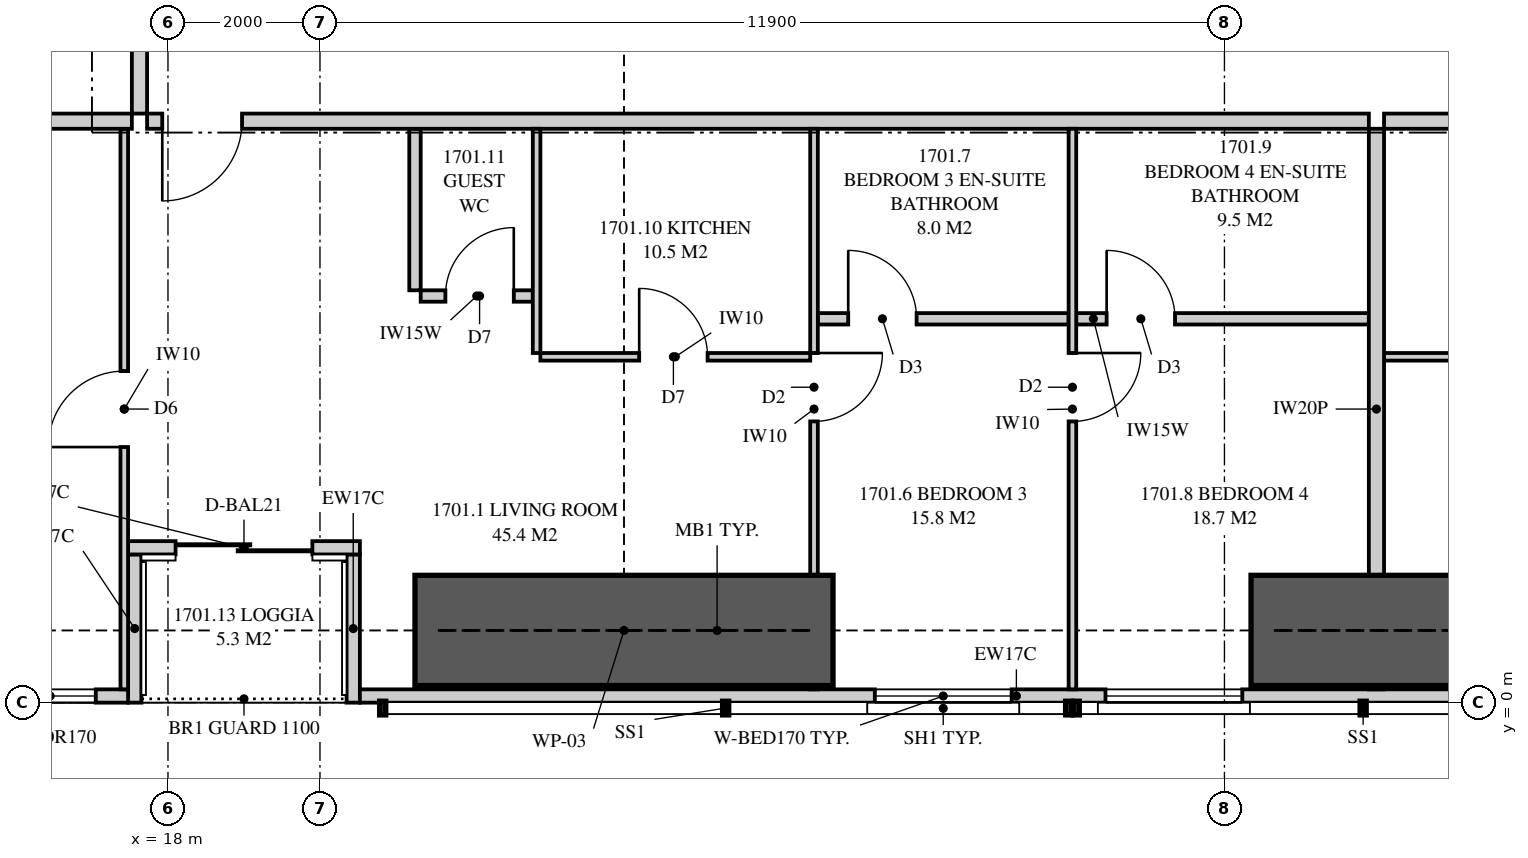
"""IFC4 building model, lengths in metres.
Left out: names, types, materials, properties, quantities, classifications, styles, units other than length and angle.
Written with IfcOpenShell. Run it as: python <this file> out.ifc"""

import sys

from ifc_helpers import new_model, si_unit, direction, frame, frame_2d, origin, place, context, subcontext, project, spatial, polyline, rectangle, outline, extrude, element, fill, save


model = new_model("IFC4")
c1 = context("Model", 3, precision=1e-05, world=origin(), true_north=direction((0.0, 1.0)))
c2 = subcontext(c1, "Body", "Model", "MODEL_VIEW")
j1 = project(units=[si_unit("LENGTHUNIT", "METRE"), si_unit("PLANEANGLEUNIT", "RADIAN")], contexts=[c1])
p1 = place(None, origin())
s1 = spatial("IfcSite", under=j1, at=p1, CompositionType="ELEMENT")
p2 = place(p1, origin())
s2 = spatial("IfcBuilding", under=s1, at=p2, CompositionType="ELEMENT")
p3 = place(p2, frame((0.0, 0.0, 64.55)))
s3 = spatial("IfcBuildingStorey", under=s2, at=p3, CompositionType="ELEMENT", Elevation=64.55)
p4 = place(p3, frame((5.051, 0.087, 0.0), z_axis=(0.0, 0.0, 1.0), x_axis=(1.0, 0.0, 0.0)))
e1 = element("IfcWall", 1, at=p4, inside=s3, PredefinedType="SOLIDWALL", context=c2, shape_type="SweptSolid", body=[
    extrude(outline(polyline([(0.0, 0.0), (12.424, 0.0), (12.424, 2.15), (7.949, 2.15), (7.949, 3.11), (7.793, 3.11), (7.793, 2.15), (7.745, 2.15), (7.745, 3.11), (0.0, 3.11), (0.0, 0.0)])), frame((0.0, 0.087, 0.0), z_axis=(0.0, -1.0, 0.0), x_axis=(1.0, 0.0, 0.0)), (0.0, 0.0, 1.0), 0.175),
])
p5 = place(p4, frame((2.224, 0.0, 0.4)))
e2 = element("IfcOpeningElement", 2, at=p5, cuts=e1, PredefinedType="OPENING", context=c2, shape_type="SweptSolid", body=[
    extrude(rectangle(XDim=1.8, YDim=1.7, at=frame_2d((0.9, 0.85))), frame((0.0, 0.097, 0.0), z_axis=(0.0, -1.0, 0.0), x_axis=(1.0, 0.0, 0.0)), (0.0, 0.0, 1.0), 0.195),
])
p6 = place(p4, frame((10.799, 0.0, 0.4)))
e3 = element("IfcOpeningElement", 3, at=p6, cuts=e1, PredefinedType="OPENING", context=c2, shape_type="SweptSolid", body=[
    extrude(rectangle(XDim=1.2, YDim=1.7, at=frame_2d((0.6, 0.85))), frame((0.0, 0.097, 0.0), z_axis=(0.0, -1.0, 0.0), x_axis=(1.0, 0.0, 0.0)), (0.0, 0.0, 1.0), 0.195),
])
p7 = place(p3, frame((20.525, 0.087, 0.0), z_axis=(0.0, 0.0, 1.0), x_axis=(1.0, 0.0, 0.0)))
e4 = element("IfcWall", 4, at=p7, inside=s3, PredefinedType="SOLIDWALL", context=c2, shape_type="SweptSolid", body=[
    extrude(outline(polyline([(0.0, 0.0), (17.275, 0.0), (17.275, 3.11), (14.679, 3.11), (14.679, 2.15), (14.631, 2.15), (14.631, 3.11), (14.475, 3.11), (14.475, 2.15), (0.0, 2.15), (0.0, 0.0)])), frame((0.0, 0.087, 0.0), z_axis=(0.0, -1.0, 0.0), x_axis=(1.0, 0.0, 0.0)), (0.0, 0.0, 1.0), 0.175),
])
p8 = place(p7, frame((6.775, 0.0, 0.4)))
e5 = element("IfcOpeningElement", 5, at=p8, cuts=e4, PredefinedType="OPENING", context=c2, shape_type="SweptSolid", body=[
    extrude(rectangle(XDim=1.8, YDim=1.7, at=frame_2d((0.9, 0.85))), frame((0.0, 0.097, 0.0), z_axis=(0.0, -1.0, 0.0), x_axis=(1.0, 0.0, 0.0)), (0.0, 0.0, 1.0), 0.195),
])
p9 = place(p7, frame((9.81, 0.0, 0.4)))
e6 = element("IfcOpeningElement", 6, at=p9, cuts=e4, PredefinedType="OPENING", context=c2, shape_type="SweptSolid", body=[
    extrude(rectangle(XDim=1.8, YDim=1.7, at=frame_2d((0.9, 0.85))), frame((0.0, 0.097, 0.0), z_axis=(0.0, -1.0, 0.0), x_axis=(1.0, 0.0, 0.0)), (0.0, 0.0, 1.0), 0.195),
])
p10 = place(p3, frame((17.475, 2.038, 0.0), z_axis=(0.0, 0.0, 1.0), x_axis=(1.0, 0.0, 0.0)))
e7 = element("IfcWall", 7, at=p10, inside=s3, PredefinedType="SOLIDWALL", context=c2, shape_type="SweptSolid", body=[
    extrude(rectangle(XDim=3.05, YDim=0.175, at=frame_2d((1.525, 0.0))), origin(), (0.0, 0.0, 1.0), 3.11),
])
p11 = place(p10, frame((0.625, 0.0, 0.0)))
e8 = element("IfcOpeningElement", 8, at=p11, cuts=e7, PredefinedType="OPENING", context=c2, shape_type="SweptSolid", body=[
    extrude(rectangle(XDim=1.8, YDim=2.1, at=frame_2d((0.9, 1.05))), frame((0.0, 0.097, 0.0), z_axis=(0.0, -1.0, 0.0), x_axis=(1.0, 0.0, 0.0)), (0.0, 0.0, 1.0), 0.195),
])
for number, where, z_axis, x_axis in (
    (9, (17.562, 0.0, 0.0), (0.0, 0.0, 1.0), (0.0, 1.0, 0.0)),
    (10, (20.438, 0.0, 0.0), (0.0, 0.0, 1.0), (0.0, 1.0, 0.0)),
):
    element("IfcWall", number, at=place(p3, frame(where, z_axis=z_axis, x_axis=x_axis)), inside=s3, PredefinedType="SOLIDWALL", context=c2, shape_type="SweptSolid", body=[
        extrude(outline(polyline([(0.0, 0.0), (1.95, 0.0), (1.95, 3.11), (1.75, 3.11), (1.75, 2.15), (0.15, 2.15), (0.15, 3.11), (0.0, 3.11), (0.0, 0.0)])), frame((0.0, 0.087, 0.0), z_axis=(0.0, -1.0, 0.0), x_axis=(1.0, 0.0, 0.0)), (0.0, 0.0, 1.0), 0.175),
    ])
p12 = place(p3, frame((33.9, 0.175, 0.0), z_axis=(0.0, 0.0, 1.0), x_axis=(0.0, 1.0, 0.0)))
e11 = element("IfcWall", 11, at=p12, inside=s3, PredefinedType="PARTITIONING", context=c2, shape_type="SweptSolid", body=[
    extrude(outline(polyline([(0.529, 2.15), (0.0, 2.15), (0.0, 0.0), (0.529, 0.0), (0.529, 0.752), (1.021, 0.752), (1.021, 0.0), (7.375, 0.0), (7.375, 3.11), (1.685, 3.11), (1.685, 2.15), (1.021, 2.15), (1.021, 1.398), (0.529, 1.398), (0.529, 2.15)])), frame((0.0, 0.1, 0.0), z_axis=(0.0, -1.0, 0.0), x_axis=(1.0, 0.0, 0.0)), (0.0, 0.0, 1.0), 0.2),
])
p13 = place(p3, frame((17.725, 7.65, 0.0), z_axis=(0.0, 0.0, 1.0), x_axis=(1.0, 0.0, 0.0)))
e12 = element("IfcWall", 12, at=p13, inside=s3, PredefinedType="PARTITIONING", context=c2, shape_type="SweptSolid", body=[
    extrude(outline(polyline([(0.0, 0.0), (16.075, 0.0), (16.075, 3.11), (6.612, 3.11), (6.612, 2.541), (5.938, 2.541), (5.938, 3.11), (0.0, 3.11), (0.0, 0.0)])), frame((0.0, 0.1, 0.0), z_axis=(0.0, -1.0, 0.0), x_axis=(1.0, 0.0, 0.0)), (0.0, 0.0, 1.0), 0.2),
])
p14 = place(p13, frame((0.2, 0.0, 0.0)))
e13 = element("IfcOpeningElement", 13, at=p14, cuts=e12, PredefinedType="OPENING", context=c2, shape_type="SweptSolid", body=[
    extrude(rectangle(XDim=1.05, YDim=2.2, at=frame_2d((0.525, 1.1))), frame((0.0, 0.11, 0.0), z_axis=(0.0, -1.0, 0.0), x_axis=(1.0, 0.0, 0.0)), (0.0, 0.0, 1.0), 0.22),
])
p15 = place(p3, frame((26.5, 0.175, 0.0), z_axis=(0.0, 0.0, 1.0), x_axis=(0.0, 1.0, 0.0)))
e14 = element("IfcWall", 14, at=p15, inside=s3, PredefinedType="PARTITIONING", context=c2, shape_type="SweptSolid", body=[
    extrude(outline(polyline([(0.0, 0.0), (7.375, 0.0), (7.375, 3.11), (1.635, 3.11), (1.635, 2.15), (0.0, 2.15), (0.0, 3.11), (0.0, 0.0)])), frame((0.0, 0.05, 0.0), z_axis=(0.0, -1.0, 0.0), x_axis=(1.0, 0.0, 0.0)), (0.0, 0.0, 1.0), 0.1),
])
p16 = place(p15, frame((3.525, 0.0, 0.0)))
e15 = element("IfcOpeningElement", 15, at=p16, cuts=e14, PredefinedType="OPENING", context=c2, shape_type="SweptSolid", body=[
    extrude(rectangle(XDim=0.9, YDim=2.1, at=frame_2d((0.45, 1.05))), frame((0.0, 0.06, 0.0), z_axis=(0.0, -1.0, 0.0), x_axis=(1.0, 0.0, 0.0)), (0.0, 0.0, 1.0), 0.12),
])
p17 = place(p3, frame((29.9, 0.175, 0.0), z_axis=(0.0, 0.0, 1.0), x_axis=(0.0, 1.0, 0.0)))
e16 = element("IfcWall", 16, at=p17, inside=s3, PredefinedType="PARTITIONING", context=c2, shape_type="SweptSolid", body=[
    extrude(outline(polyline([(0.0, 0.0), (7.375, 0.0), (7.375, 3.11), (1.635, 3.11), (1.635, 2.15), (0.0, 2.15), (0.0, 3.11), (0.0, 0.0)])), frame((0.0, 0.05, 0.0), z_axis=(0.0, -1.0, 0.0), x_axis=(1.0, 0.0, 0.0)), (0.0, 0.0, 1.0), 0.1),
])
p18 = place(p17, frame((3.525, 0.0, 0.0)))
e17 = element("IfcOpeningElement", 17, at=p18, cuts=e16, PredefinedType="OPENING", context=c2, shape_type="SweptSolid", body=[
    extrude(rectangle(XDim=0.9, YDim=2.1, at=frame_2d((0.45, 1.05))), frame((0.0, 0.06, 0.0), z_axis=(0.0, -1.0, 0.0), x_axis=(1.0, 0.0, 0.0)), (0.0, 0.0, 1.0), 0.12),
])
p19 = place(p3, frame((26.55, 5.05, 0.0), z_axis=(0.0, 0.0, 1.0), x_axis=(1.0, 0.0, 0.0)))
e18 = element("IfcWall", 18, at=p19, inside=s3, PredefinedType="PLUMBINGWALL", context=c2, shape_type="SweptSolid", body=[
    extrude(rectangle(XDim=3.3, YDim=0.15, at=frame_2d((1.65, 0.0))), origin(), (0.0, 0.0, 1.0), 3.11),
])
p20 = place(p19, frame((0.4, 0.0, 0.0)))
e19 = element("IfcOpeningElement", 19, at=p20, cuts=e18, PredefinedType="OPENING", context=c2, shape_type="SweptSolid", body=[
    extrude(rectangle(XDim=0.9, YDim=2.1, at=frame_2d((0.45, 1.05))), frame((0.0, 0.085, 0.0), z_axis=(0.0, -1.0, 0.0), x_axis=(1.0, 0.0, 0.0)), (0.0, 0.0, 1.0), 0.17),
])
p21 = place(p3, frame((29.95, 5.05, 0.0), z_axis=(0.0, 0.0, 1.0), x_axis=(1.0, 0.0, 0.0)))
e20 = element("IfcWall", 20, at=p21, inside=s3, PredefinedType="PLUMBINGWALL", context=c2, shape_type="SweptSolid", body=[
    extrude(rectangle(XDim=3.85, YDim=0.15, at=frame_2d((1.925, 0.0))), origin(), (0.0, 0.0, 1.0), 3.11),
])
p22 = place(p21, frame((0.4, 0.0, 0.0)))
e21 = element("IfcOpeningElement", 21, at=p22, cuts=e20, PredefinedType="OPENING", context=c2, shape_type="SweptSolid", body=[
    extrude(rectangle(XDim=0.9, YDim=2.1, at=frame_2d((0.45, 1.05))), frame((0.0, 0.085, 0.0), z_axis=(0.0, -1.0, 0.0), x_axis=(1.0, 0.0, 0.0)), (0.0, 0.0, 1.0), 0.17),
])
p23 = place(p3, frame((22.9, 4.55, 0.0), z_axis=(0.0, 0.0, 1.0), x_axis=(1.0, 0.0, 0.0)))
e22 = element("IfcWall", 22, at=p23, inside=s3, PredefinedType="PARTITIONING", context=c2, shape_type="SweptSolid", body=[
    extrude(outline(polyline([(0.0, 0.0), (3.55, 0.0), (3.55, 3.11), (1.387, 3.11), (1.387, 2.541), (0.812, 2.541), (0.812, 3.11), (0.0, 3.11), (0.0, 0.0)])), frame((0.0, 0.05, 0.0), z_axis=(0.0, -1.0, 0.0), x_axis=(1.0, 0.0, 0.0)), (0.0, 0.0, 1.0), 0.1),
])
p24 = place(p23, frame((1.3, 0.0, 0.0)))
e23 = element("IfcOpeningElement", 23, at=p24, cuts=e22, PredefinedType="OPENING", context=c2, shape_type="SweptSolid", body=[
    extrude(rectangle(XDim=0.9, YDim=2.1, at=frame_2d((0.45, 1.05))), frame((0.0, 0.06, 0.0), z_axis=(0.0, -1.0, 0.0), x_axis=(1.0, 0.0, 0.0)), (0.0, 0.0, 1.0), 0.12),
])
p25 = place(p3, frame((22.85, 4.6, 0.0), z_axis=(0.0, 0.0, 1.0), x_axis=(0.0, 1.0, 0.0)))
e24 = element("IfcWall", 24, at=p25, inside=s3, PredefinedType="PARTITIONING", context=c2, shape_type="SweptSolid", body=[
    extrude(rectangle(XDim=2.95, YDim=0.1, at=frame_2d((1.475, 0.0))), origin(), (0.0, 0.0, 1.0), 3.11),
])
p26 = place(p3, frame((21.325, 5.35, 0.0), z_axis=(0.0, 0.0, 1.0), x_axis=(1.0, 0.0, 0.0)))
e25 = element("IfcWall", 25, at=p26, inside=s3, PredefinedType="PLUMBINGWALL", context=c2, shape_type="SweptSolid", body=[
    extrude(rectangle(XDim=1.475, YDim=0.15, at=frame_2d((0.738, 0.0))), origin(), (0.0, 0.0, 1.0), 3.11),
])
p27 = place(p26, frame((0.325, 0.0, 0.0)))
e26 = element("IfcOpeningElement", 26, at=p27, cuts=e25, PredefinedType="OPENING", context=c2, shape_type="SweptSolid", body=[
    extrude(rectangle(XDim=0.9, YDim=2.1, at=frame_2d((0.45, 1.05))), frame((0.0, 0.085, 0.0), z_axis=(0.0, -1.0, 0.0), x_axis=(1.0, 0.0, 0.0)), (0.0, 0.0, 1.0), 0.17),
])
p28 = place(p3, frame((21.25, 5.425, 0.0), z_axis=(0.0, 0.0, 1.0), x_axis=(0.0, 1.0, 0.0)))
e27 = element("IfcWall", 27, at=p28, inside=s3, PredefinedType="PLUMBINGWALL", context=c2, shape_type="SweptSolid", body=[
    extrude(rectangle(XDim=2.125, YDim=0.15, at=frame_2d((1.062, 0.0))), origin(), (0.0, 0.0, 1.0), 3.11),
])
p29 = place(p3, frame((17.425, 0.175, 0.0), z_axis=(0.0, 0.0, 1.0), x_axis=(0.0, 1.0, 0.0)))
e28 = element("IfcWall", 28, at=p29, inside=s3, PredefinedType="PARTITIONING", context=c2, shape_type="SweptSolid", body=[
    extrude(outline(polyline([(0.0, 0.0), (7.375, 0.0), (7.375, 3.11), (1.635, 3.11), (1.635, 2.15), (0.0, 2.15), (0.0, 3.11), (0.0, 0.0)])), frame((0.0, 0.05, 0.0), z_axis=(0.0, -1.0, 0.0), x_axis=(1.0, 0.0, 0.0)), (0.0, 0.0, 1.0), 0.1),
])
p30 = place(p29, frame((3.188, 0.0, 0.0)))
e29 = element("IfcOpeningElement", 29, at=p30, cuts=e28, PredefinedType="OPENING", context=c2, shape_type="SweptSolid", body=[
    extrude(rectangle(XDim=1.0, YDim=2.1, at=frame_2d((0.5, 1.05))), frame((0.0, 0.06, 0.0), z_axis=(0.0, -1.0, 0.0), x_axis=(1.0, 0.0, 0.0)), (0.0, 0.0, 1.0), 0.12),
])
p31 = place(p3, frame((34.0, 7.65, 0.0), z_axis=(0.0, 0.0, 1.0), x_axis=(1.0, 0.0, 0.0)))
e30 = element("IfcWall", 30, at=p31, inside=s3, PredefinedType="PARTITIONING", context=c2, shape_type="SweptSolid", body=[
    extrude(outline(polyline([(0.0, 0.0), (12.0, 0.0), (12.0, 3.11), (11.104, 3.11), (11.104, 2.15), (9.26, 2.15), (9.26, 3.11), (1.337, 3.11), (1.337, 2.541), (0.663, 2.541), (0.663, 3.11), (0.0, 3.11), (0.0, 0.0)])), frame((0.0, 0.1, 0.0), z_axis=(0.0, -1.0, 0.0), x_axis=(1.0, 0.0, 0.0)), (0.0, 0.0, 1.0), 0.2),
])
p32 = place(p31, frame((2.4, 0.0, 0.0)))
e31 = element("IfcOpeningElement", 31, at=p32, cuts=e30, PredefinedType="OPENING", context=c2, shape_type="SweptSolid", body=[
    extrude(rectangle(XDim=1.05, YDim=2.2, at=frame_2d((0.525, 1.1))), frame((0.0, 0.11, 0.0), z_axis=(0.0, -1.0, 0.0), x_axis=(1.0, 0.0, 0.0)), (0.0, 0.0, 1.0), 0.22),
])
p33 = place(p3, frame((34.0, 4.55, 0.0), z_axis=(0.0, 0.0, 1.0), x_axis=(1.0, 0.0, 0.0)))
e32 = element("IfcWall", 32, at=p33, inside=s3, PredefinedType="PARTITIONING", context=c2, shape_type="SweptSolid", body=[
    extrude(outline(polyline([(0.0, 0.0), (3.55, 0.0), (3.55, 3.11), (1.287, 3.11), (1.287, 2.541), (0.713, 2.541), (0.713, 3.11), (0.0, 3.11), (0.0, 0.0)])), frame((0.0, 0.05, 0.0), z_axis=(0.0, -1.0, 0.0), x_axis=(1.0, 0.0, 0.0)), (0.0, 0.0, 1.0), 0.1),
])
p34 = place(p33, frame((1.35, 0.0, 0.0)))
e33 = element("IfcOpeningElement", 33, at=p34, cuts=e32, PredefinedType="OPENING", context=c2, shape_type="SweptSolid", body=[
    extrude(rectangle(XDim=0.9, YDim=2.1, at=frame_2d((0.45, 1.05))), frame((0.0, 0.06, 0.0), z_axis=(0.0, -1.0, 0.0), x_axis=(1.0, 0.0, 0.0)), (0.0, 0.0, 1.0), 0.12),
])
p35 = place(p3, frame((2.0, 7.65, 0.0), z_axis=(0.0, 0.0, 1.0), x_axis=(1.0, 0.0, 0.0)))
e34 = element("IfcWall", 34, at=p35, inside=s3, PredefinedType="PARTITIONING", context=c2, shape_type="SweptSolid", body=[
    extrude(outline(polyline([(0.0, 0.0), (15.525, 0.0), (15.525, 3.11), (11.337, 3.11), (11.337, 2.541), (10.663, 2.541), (10.663, 3.11), (9.51, 3.11), (9.51, 2.51), (6.89, 2.51), (6.89, 3.11), (2.969, 3.11), (2.969, 2.541), (2.74, 2.541), (2.74, 2.15), (0.896, 2.15), (0.896, 3.11), (0.0, 3.11), (0.0, 0.0)])), frame((0.0, 0.1, 0.0), z_axis=(0.0, -1.0, 0.0), x_axis=(1.0, 0.0, 0.0)), (0.0, 0.0, 1.0), 0.2),
])
p36 = place(p3, frame((17.625, 7.75, 0.0), z_axis=(0.0, 0.0, 1.0), x_axis=(0.0, 1.0, 0.0)))
e35 = element("IfcWall", 35, at=p36, inside=s3, PredefinedType="PARTITIONING", context=c2, shape_type="SweptSolid", body=[
    extrude(outline(polyline([(0.0, 0.0), (6.15, 0.0), (6.15, 3.11), (5.587, 3.11), (5.587, 2.541), (4.913, 2.541), (4.913, 3.11), (0.0, 3.11), (0.0, 0.0)])), frame((0.0, 0.1, 0.0), z_axis=(0.0, -1.0, 0.0), x_axis=(1.0, 0.0, 0.0)), (0.0, 0.0, 1.0), 0.2),
])
p37 = place(p36, frame((2.175, 0.0, 0.0)))
e36 = element("IfcOpeningElement", 36, at=p37, cuts=e35, PredefinedType="OPENING", context=c2, shape_type="SweptSolid", body=[
    extrude(rectangle(XDim=1.8, YDim=2.1, at=frame_2d((0.9, 1.05))), frame((0.0, 0.11, 0.0), z_axis=(0.0, -1.0, 0.0), x_axis=(1.0, 0.0, 0.0)), (0.0, 0.0, 1.0), 0.22),
])
for number, where, z_axis, x_axis in (
    (37, (21.25, 0.95, 0.0), (0.0, 0.0, 1.0), (1.0, 0.0, 0.0)),
    (38, (32.25, 0.95, 0.0), (0.0, 0.0, 1.0), (1.0, 0.0, 0.0)),
):
    element("IfcWall", number, at=place(p3, frame(where, z_axis=z_axis, x_axis=x_axis)), inside=s3, PredefinedType="SHEAR", context=c2, shape_type="SweptSolid", body=[
        extrude(rectangle(XDim=5.5, YDim=1.45, at=frame_2d((2.75, 0.0))), origin(), (0.0, 0.0, 1.0), 3.35),
    ])
p38 = place(p6, origin())
e39 = element("IfcWindow", 39, at=p38, inside=s3, PartitioningType="SINGLE_PANEL", PredefinedType="WINDOW", context=c2, shape_type="SweptSolid", body=[
    extrude(rectangle(XDim=1.2, YDim=1.7, at=frame_2d((0.6, 0.85))), frame((0.0, 0.03, 0.0), z_axis=(0.0, -1.0, 0.0), x_axis=(1.0, 0.0, 0.0)), (0.0, 0.0, 1.0), 0.06),
])
fill(e3, e39)
p39 = place(p11, origin())
e40 = element("IfcDoor", 40, at=p39, inside=s3, OperationType="SLIDING_TO_LEFT", PredefinedType="DOOR", context=c2, shape_type="SweptSolid", body=[
    extrude(rectangle(XDim=1.8, YDim=2.1, at=frame_2d((0.9, 1.05))), frame((0.0, 0.025, 0.0), z_axis=(0.0, -1.0, 0.0), x_axis=(1.0, 0.0, 0.0)), (0.0, 0.0, 1.0), 0.05),
])
fill(e8, e40)
p40 = place(p8, origin())
e41 = element("IfcWindow", 41, at=p40, inside=s3, PartitioningType="SINGLE_PANEL", PredefinedType="WINDOW", context=c2, shape_type="SweptSolid", body=[
    extrude(rectangle(XDim=1.8, YDim=1.7, at=frame_2d((0.9, 0.85))), frame((0.0, 0.03, 0.0), z_axis=(0.0, -1.0, 0.0), x_axis=(1.0, 0.0, 0.0)), (0.0, 0.0, 1.0), 0.06),
])
fill(e5, e41)
p41 = place(p9, origin())
e42 = element("IfcWindow", 42, at=p41, inside=s3, PartitioningType="SINGLE_PANEL", PredefinedType="WINDOW", context=c2, shape_type="SweptSolid", body=[
    extrude(rectangle(XDim=1.8, YDim=1.7, at=frame_2d((0.9, 0.85))), frame((0.0, 0.03, 0.0), z_axis=(0.0, -1.0, 0.0), x_axis=(1.0, 0.0, 0.0)), (0.0, 0.0, 1.0), 0.06),
])
fill(e6, e42)
p42 = place(p14, frame((1.05, 0.0, 0.0), z_axis=(0.0, 0.0, 1.0), x_axis=(-1.0, 0.0, 0.0)))
e43 = element("IfcDoor", 43, at=p42, inside=s3, OperationType="SINGLE_SWING_RIGHT", PredefinedType="DOOR", context=c2, shape_type="SweptSolid", body=[
    extrude(rectangle(XDim=1.05, YDim=2.2, at=frame_2d((0.525, 1.1))), frame((0.0, 0.025, 0.0), z_axis=(0.0, -1.0, 0.0), x_axis=(1.0, 0.0, 0.0)), (0.0, 0.0, 1.0), 0.05),
])
fill(e13, e43)
p43 = place(p16, frame((0.9, 0.0, 0.0), z_axis=(0.0, 0.0, 1.0), x_axis=(-1.0, 0.0, 0.0)))
e44 = element("IfcDoor", 44, at=p43, inside=s3, OperationType="SINGLE_SWING_LEFT", PredefinedType="DOOR", context=c2, shape_type="SweptSolid", body=[
    extrude(rectangle(XDim=0.9, YDim=2.1, at=frame_2d((0.45, 1.05))), frame((0.0, 0.025, 0.0), z_axis=(0.0, -1.0, 0.0), x_axis=(1.0, 0.0, 0.0)), (0.0, 0.0, 1.0), 0.05),
])
fill(e15, e44)
p44 = place(p20, origin())
e45 = element("IfcDoor", 45, at=p44, inside=s3, OperationType="SINGLE_SWING_LEFT", PredefinedType="DOOR", context=c2, shape_type="SweptSolid", body=[
    extrude(rectangle(XDim=0.9, YDim=2.1, at=frame_2d((0.45, 1.05))), frame((0.0, 0.025, 0.0), z_axis=(0.0, -1.0, 0.0), x_axis=(1.0, 0.0, 0.0)), (0.0, 0.0, 1.0), 0.05),
])
fill(e19, e45)
p45 = place(p18, frame((0.9, 0.0, 0.0), z_axis=(0.0, 0.0, 1.0), x_axis=(-1.0, 0.0, 0.0)))
e46 = element("IfcDoor", 46, at=p45, inside=s3, OperationType="SINGLE_SWING_LEFT", PredefinedType="DOOR", context=c2, shape_type="SweptSolid", body=[
    extrude(rectangle(XDim=0.9, YDim=2.1, at=frame_2d((0.45, 1.05))), frame((0.0, 0.025, 0.0), z_axis=(0.0, -1.0, 0.0), x_axis=(1.0, 0.0, 0.0)), (0.0, 0.0, 1.0), 0.05),
])
fill(e17, e46)
p46 = place(p22, origin())
e47 = element("IfcDoor", 47, at=p46, inside=s3, OperationType="SINGLE_SWING_LEFT", PredefinedType="DOOR", context=c2, shape_type="SweptSolid", body=[
    extrude(rectangle(XDim=0.9, YDim=2.1, at=frame_2d((0.45, 1.05))), frame((0.0, 0.025, 0.0), z_axis=(0.0, -1.0, 0.0), x_axis=(1.0, 0.0, 0.0)), (0.0, 0.0, 1.0), 0.05),
])
fill(e21, e47)
p47 = place(p24, origin())
e48 = element("IfcDoor", 48, at=p47, inside=s3, OperationType="SINGLE_SWING_LEFT", PredefinedType="DOOR", context=c2, shape_type="SweptSolid", body=[
    extrude(rectangle(XDim=0.9, YDim=2.1, at=frame_2d((0.45, 1.05))), frame((0.0, 0.025, 0.0), z_axis=(0.0, -1.0, 0.0), x_axis=(1.0, 0.0, 0.0)), (0.0, 0.0, 1.0), 0.05),
])
fill(e23, e48)
p48 = place(p27, origin())
e49 = element("IfcDoor", 49, at=p48, inside=s3, OperationType="SINGLE_SWING_RIGHT", PredefinedType="DOOR", context=c2, shape_type="SweptSolid", body=[
    extrude(rectangle(XDim=0.9, YDim=2.1, at=frame_2d((0.45, 1.05))), frame((0.0, 0.025, 0.0), z_axis=(0.0, -1.0, 0.0), x_axis=(1.0, 0.0, 0.0)), (0.0, 0.0, 1.0), 0.05),
])
fill(e26, e49)
p49 = place(p30, origin())
e50 = element("IfcDoor", 50, at=p49, inside=s3, OperationType="SINGLE_SWING_LEFT", PredefinedType="DOOR", context=c2, shape_type="SweptSolid", body=[
    extrude(rectangle(XDim=1.0, YDim=2.1, at=frame_2d((0.5, 1.05))), frame((0.0, 0.025, 0.0), z_axis=(0.0, -1.0, 0.0), x_axis=(1.0, 0.0, 0.0)), (0.0, 0.0, 1.0), 0.05),
])
fill(e29, e50)
save(model, sys.argv[1])
